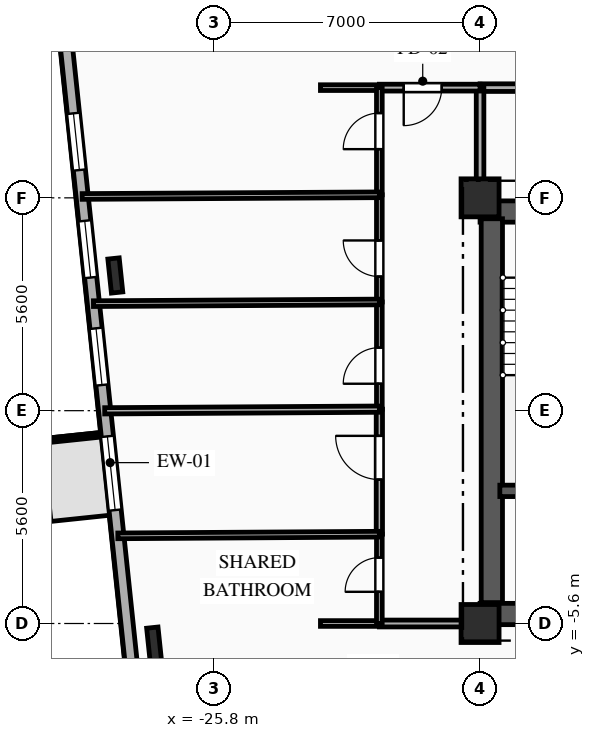
"""IFC4 building model, lengths in metres.
Left out: names, types, materials, properties, quantities, classifications, styles, units other than length and angle.
Written with IfcOpenShell. Run it as: python <this file> out.ifc"""

import sys

from ifc_helpers import new_model, si_unit, direction, frame, frame_2d, origin, origin_2d, place, context, subcontext, project, spatial, rectangle, i_section, extrude, element, fill, save


model = new_model("IFC4")
c1 = context("Model", 3, precision=1e-05, world=origin(), true_north=direction((0.0, 1.0)))
c2 = subcontext(c1, "Body", "Model", "MODEL_VIEW")
j1 = project(units=[si_unit("LENGTHUNIT", "METRE"), si_unit("PLANEANGLEUNIT", "RADIAN")], contexts=[c1])
p1 = place(None, origin())
s1 = spatial("IfcSite", under=j1, at=p1, CompositionType="ELEMENT")
p2 = place(p1, origin())
s2 = spatial("IfcBuilding", under=s1, at=p2, CompositionType="ELEMENT")
p3 = place(p2, frame((0.0, 0.0, 82.35)))
s3 = spatial("IfcBuildingStorey", under=s2, at=p3, CompositionType="ELEMENT", Elevation=82.35)
for number, where, z_axis, x_axis in (
    (1, (-18.8, -5.6, 0.0), (0.0, 0.0, 1.0), (1.0, 0.0, 0.0)),
    (2, (-18.8, 5.6, 0.0), (0.0, 0.0, 1.0), (1.0, 0.0, 0.0)),
):
    element("IfcColumn", number, at=place(p3, frame(where, z_axis=z_axis, x_axis=x_axis)), inside=s3, PredefinedType="COLUMN", context=c2, shape_type="SweptSolid", body=[
        extrude(rectangle(XDim=1.0, YDim=1.0, at=origin_2d()), origin(), (0.0, 0.0, 1.0), 3.35),
    ])
for number, where, z_axis, x_axis in (
    (3, (-28.398, 3.557, 0.0), (0.0, 0.0, 1.0), (0.995, 0.105, 0.0)),
    (4, (-27.377, -6.156, 0.0), (0.0, 0.0, 1.0), (0.995, 0.105, 0.0)),
):
    element("IfcColumn", number, at=place(p3, frame(where, z_axis=z_axis, x_axis=x_axis)), inside=s3, PredefinedType="COLUMN", context=c2, shape_type="SweptSolid", body=[
        extrude(i_section(OverallWidth=0.3, OverallDepth=0.9, WebThickness=0.019, FlangeThickness=0.035, FilletRadius=0.03, at=origin_2d()), origin(), (0.0, 0.0, 1.0), 3.35),
    ])
p4 = place(p3, frame((-26.935, -16.583, 0.0), z_axis=(0.0, 0.0, 1.0), x_axis=(-0.104524887486, 0.994522271192, 0.0)))
e5 = element("IfcWall", 5, at=p4, inside=s3, PredefinedType="SOLIDWALL", context=c2, shape_type="SweptSolid", body=[
    extrude(rectangle(XDim=30.6, YDim=0.32, at=frame_2d((15.3, 0.0))), origin(), (0.0, 0.0, 1.0), 3.045),
])
p5 = place(p4, frame((14.045, 0.0, 0.85)))
e6 = element("IfcOpeningElement", 6, at=p5, cuts=e5, PredefinedType="OPENING", context=c2, shape_type="SweptSolid", body=[
    extrude(rectangle(XDim=1.95, YDim=1.85, at=frame_2d((0.975, 0.925))), frame((0.0, 0.17, 0.0), z_axis=(0.0, -1.0, 0.0), x_axis=(1.0, 0.0, 0.0)), (0.0, 0.0, 1.0), 0.34),
])
p6 = place(p4, frame((17.354, 0.0, 0.85)))
e7 = element("IfcOpeningElement", 7, at=p6, cuts=e5, PredefinedType="OPENING", context=c2, shape_type="SweptSolid", body=[
    extrude(rectangle(XDim=1.5, YDim=1.85, at=frame_2d((0.75, 0.925))), frame((0.0, 0.17, 0.0), z_axis=(0.0, -1.0, 0.0), x_axis=(1.0, 0.0, 0.0)), (0.0, 0.0, 1.0), 0.34),
])
p7 = place(p4, frame((20.198, 0.0, 0.85)))
e8 = element("IfcOpeningElement", 8, at=p7, cuts=e5, PredefinedType="OPENING", context=c2, shape_type="SweptSolid", body=[
    extrude(rectangle(XDim=1.5, YDim=1.85, at=frame_2d((0.75, 0.925))), frame((0.0, 0.17, 0.0), z_axis=(0.0, -1.0, 0.0), x_axis=(1.0, 0.0, 0.0)), (0.0, 0.0, 1.0), 0.34),
])
p8 = place(p4, frame((23.041, 0.0, 0.85)))
e9 = element("IfcOpeningElement", 9, at=p8, cuts=e5, PredefinedType="OPENING", context=c2, shape_type="SweptSolid", body=[
    extrude(rectangle(XDim=1.5, YDim=1.85, at=frame_2d((0.75, 0.925))), frame((0.0, 0.17, 0.0), z_axis=(0.0, -1.0, 0.0), x_axis=(1.0, 0.0, 0.0)), (0.0, 0.0, 1.0), 0.34),
])
p9 = place(p3, frame((-18.8, 5.24, 0.0), z_axis=(0.0, 0.0, 1.0), x_axis=(1.0, 0.0, 0.0)))
e10 = element("IfcWall", 10, at=p9, inside=s3, PredefinedType="SHEAR", context=c2, shape_type="SweptSolid", body=[
    extrude(rectangle(XDim=9.6, YDim=0.56, at=frame_2d((4.8, 0.0))), origin(), (0.0, 0.0, 1.0), 3.045),
])
p10 = place(p9, frame((1.55, 0.0, 0.0)))
e11 = element("IfcOpeningElement", 11, at=p10, cuts=e10, PredefinedType="OPENING", context=c2, shape_type="SweptSolid", body=[
    extrude(rectangle(XDim=1.1, YDim=2.15, at=frame_2d((0.55, 1.075))), frame((0.0, 0.29, 0.0), z_axis=(0.0, -1.0, 0.0), x_axis=(1.0, 0.0, 0.0)), (0.0, 0.0, 1.0), 0.58),
])
p11 = place(p9, frame((4.775, 0.0, 0.0)))
e12 = element("IfcOpeningElement", 12, at=p11, cuts=e10, PredefinedType="OPENING", context=c2, shape_type="SweptSolid", body=[
    extrude(rectangle(XDim=1.05, YDim=2.1, at=frame_2d((0.525, 1.05))), frame((0.0, 0.29, 0.0), z_axis=(0.0, -1.0, 0.0), x_axis=(1.0, 0.0, 0.0)), (0.0, 0.0, 1.0), 0.58),
])
p12 = place(p3, frame((-18.8, -5.35, 0.0), z_axis=(0.0, 0.0, 1.0), x_axis=(1.0, 0.0, 0.0)))
e13 = element("IfcWall", 13, at=p12, inside=s3, PredefinedType="SHEAR", context=c2, shape_type="SweptSolid", body=[
    extrude(rectangle(XDim=9.6, YDim=0.56, at=frame_2d((4.8, 0.0))), origin(), (0.0, 0.0, 1.0), 3.045),
])
p13 = place(p12, frame((1.05, 0.0, 0.0)))
e14 = element("IfcOpeningElement", 14, at=p13, cuts=e13, PredefinedType="OPENING", context=c2, shape_type="SweptSolid", body=[
    extrude(rectangle(XDim=0.9, YDim=2.1, at=frame_2d((0.45, 1.05))), frame((0.0, 0.29, 0.0), z_axis=(0.0, -1.0, 0.0), x_axis=(1.0, 0.0, 0.0)), (0.0, 0.0, 1.0), 0.58),
])
p14 = place(p3, frame((-18.49, -5.05, 0.0), z_axis=(0.0, 0.0, 1.0), x_axis=(0.0, 1.0, 0.0)))
e15 = element("IfcWall", 15, at=p14, inside=s3, PredefinedType="SHEAR", context=c2, shape_type="SweptSolid", body=[
    extrude(rectangle(XDim=10.1, YDim=0.56, at=frame_2d((5.05, 0.0))), origin(), (0.0, 0.0, 1.0), 3.045),
])
p15 = place(p3, frame((-18.28, -2.11, 0.0), z_axis=(0.0, 0.0, 1.0), x_axis=(1.0, 0.0, 0.0)))
e16 = element("IfcWall", 16, at=p15, inside=s3, PredefinedType="SHEAR", context=c2, shape_type="SweptSolid", body=[
    extrude(rectangle(XDim=3.18, YDim=0.3, at=frame_2d((1.59, 0.0))), origin(), (0.0, 0.0, 1.0), 3.045),
])
p16 = place(p3, frame((-12.0, 8.5, 0.0), z_axis=(0.0, 0.0, 1.0), x_axis=(-1.0, 0.0, 0.0)))
e17 = element("IfcWall", 17, at=p16, inside=s3, PredefinedType="PARTITIONING", context=c2, shape_type="SweptSolid", body=[
    extrude(rectangle(XDim=6.8, YDim=0.2, at=frame_2d((3.4, 0.0))), origin(), (0.0, 0.0, 1.0), 3.045),
])
p17 = place(p16, frame((1.715, 0.0, 0.0)))
e18 = element("IfcOpeningElement", 18, at=p17, cuts=e17, PredefinedType="OPENING", context=c2, shape_type="SweptSolid", body=[
    extrude(rectangle(XDim=1.1, YDim=2.15, at=frame_2d((0.55, 1.075))), frame((0.0, 0.11, 0.0), z_axis=(0.0, -1.0, 0.0), x_axis=(1.0, 0.0, 0.0)), (0.0, 0.0, 1.0), 0.22),
])
p18 = place(p3, frame((-18.8, 8.5, 0.0), z_axis=(0.0, 0.0, 1.0), x_axis=(0.0, -1.0, 0.0)))
e19 = element("IfcWall", 19, at=p18, inside=s3, PredefinedType="PARTITIONING", context=c2, shape_type="SweptSolid", body=[
    extrude(rectangle(XDim=2.9, YDim=0.2, at=frame_2d((1.45, 0.0))), origin(), (0.0, 0.0, 1.0), 2.53),
])
p19 = place(p3, frame((-18.8, 8.5, 0.0), z_axis=(0.0, 0.0, 1.0), x_axis=(-1.0, 0.0, 0.0)))
e20 = element("IfcWall", 20, at=p19, inside=s3, PredefinedType="PARTITIONING", context=c2, shape_type="SweptSolid", body=[
    extrude(rectangle(XDim=2.65, YDim=0.18, at=frame_2d((1.325, 0.0))), origin(), (0.0, 0.0, 1.0), 3.045),
])
p20 = place(p19, frame((1.009, 0.0, 0.0)))
e21 = element("IfcOpeningElement", 21, at=p20, cuts=e20, PredefinedType="OPENING", context=c2, shape_type="SweptSolid", body=[
    extrude(rectangle(XDim=1.0, YDim=2.15, at=frame_2d((0.5, 1.075))), frame((0.0, 0.1, 0.0), z_axis=(0.0, -1.0, 0.0), x_axis=(1.0, 0.0, 0.0)), (0.0, 0.0, 1.0), 0.2),
])
p21 = place(p3, frame((-21.45, 8.5, 0.0), z_axis=(0.0, 0.0, 1.0), x_axis=(-1.0, 0.0, 0.0)))
e22 = element("IfcWall", 22, at=p21, inside=s3, PredefinedType="PARTITIONING", context=c2, shape_type="SweptSolid", body=[
    extrude(rectangle(XDim=1.55, YDim=0.15, at=frame_2d((0.775, 0.0))), origin(), (0.0, 0.0, 1.0), 3.045),
])
p22 = place(p3, frame((-21.45, -5.6, 0.0), z_axis=(0.0, 0.0, 1.0), x_axis=(1.0, 0.0, 0.0)))
e23 = element("IfcWall", 23, at=p22, inside=s3, PredefinedType="PARTITIONING", context=c2, shape_type="SweptSolid", body=[
    extrude(rectangle(XDim=2.65, YDim=0.18, at=frame_2d((1.325, 0.0))), origin(), (0.0, 0.0, 1.0), 3.045),
])
p23 = place(p3, frame((-23.0, -5.6, 0.0), z_axis=(0.0, 0.0, 1.0), x_axis=(1.0, 0.0, 0.0)))
e24 = element("IfcWall", 24, at=p23, inside=s3, PredefinedType="PLUMBINGWALL", context=c2, shape_type="SweptSolid", body=[
    extrude(rectangle(XDim=1.55, YDim=0.15, at=frame_2d((0.775, 0.0))), origin(), (0.0, 0.0, 1.0), 3.045),
])
p24 = place(p3, frame((-21.45, -5.6, 0.0), z_axis=(0.0, 0.0, 1.0), x_axis=(0.0, 1.0, 0.0)))
e25 = element("IfcWall", 25, at=p24, inside=s3, PredefinedType="PLUMBINGWALL", context=c2, shape_type="SweptSolid", body=[
    extrude(rectangle(XDim=2.35, YDim=0.15, at=frame_2d((1.175, 0.0))), origin(), (0.0, 0.0, 1.0), 3.045),
])
p25 = place(p24, frame((0.834, 0.0, 0.0)))
e26 = element("IfcOpeningElement", 26, at=p25, cuts=e25, PredefinedType="OPENING", context=c2, shape_type="SweptSolid", body=[
    extrude(rectangle(XDim=0.9, YDim=2.1, at=frame_2d((0.45, 1.05))), frame((0.0, 0.085, 0.0), z_axis=(0.0, -1.0, 0.0), x_axis=(1.0, 0.0, 0.0)), (0.0, 0.0, 1.0), 0.17),
])
p26 = place(p3, frame((-21.45, -3.25, 0.0), z_axis=(0.0, 0.0, 1.0), x_axis=(0.0, 1.0, 0.0)))
e27 = element("IfcWall", 27, at=p26, inside=s3, PredefinedType="PARTITIONING", context=c2, shape_type="SweptSolid", body=[
    extrude(rectangle(XDim=3.29, YDim=0.165, at=frame_2d((1.645, 0.0))), origin(), (0.0, 0.0, 1.0), 3.045),
])
p27 = place(p26, frame((1.438, 0.0, 0.0)))
e28 = element("IfcOpeningElement", 28, at=p27, cuts=e27, PredefinedType="OPENING", context=c2, shape_type="SweptSolid", body=[
    extrude(rectangle(XDim=1.15, YDim=2.15, at=frame_2d((0.575, 1.075))), frame((0.0, 0.093, 0.0), z_axis=(0.0, -1.0, 0.0), x_axis=(1.0, 0.0, 0.0)), (0.0, 0.0, 1.0), 0.185),
])
p28 = place(p3, frame((-21.45, 0.04, 0.0), z_axis=(0.0, 0.0, 1.0), x_axis=(0.0, 1.0, 0.0)))
e29 = element("IfcWall", 29, at=p28, inside=s3, PredefinedType="PARTITIONING", context=c2, shape_type="SweptSolid", body=[
    extrude(rectangle(XDim=2.82, YDim=0.15, at=frame_2d((1.41, 0.0))), origin(), (0.0, 0.0, 1.0), 3.045),
])
p29 = place(p28, frame((0.669, 0.0, 0.0)))
e30 = element("IfcOpeningElement", 30, at=p29, cuts=e29, PredefinedType="OPENING", context=c2, shape_type="SweptSolid", body=[
    extrude(rectangle(XDim=0.95, YDim=2.1, at=frame_2d((0.475, 1.05))), frame((0.0, 0.085, 0.0), z_axis=(0.0, -1.0, 0.0), x_axis=(1.0, 0.0, 0.0)), (0.0, 0.0, 1.0), 0.17),
])
p30 = place(p3, frame((-21.45, 2.86, 0.0), z_axis=(0.0, 0.0, 1.0), x_axis=(0.0, 1.0, 0.0)))
e31 = element("IfcWall", 31, at=p30, inside=s3, PredefinedType="PARTITIONING", context=c2, shape_type="SweptSolid", body=[
    extrude(rectangle(XDim=2.82, YDim=0.15, at=frame_2d((1.41, 0.0))), origin(), (0.0, 0.0, 1.0), 3.045),
])
p31 = place(p30, frame((0.669, 0.0, 0.0)))
e32 = element("IfcOpeningElement", 32, at=p31, cuts=e31, PredefinedType="OPENING", context=c2, shape_type="SweptSolid", body=[
    extrude(rectangle(XDim=0.95, YDim=2.1, at=frame_2d((0.475, 1.05))), frame((0.0, 0.085, 0.0), z_axis=(0.0, -1.0, 0.0), x_axis=(1.0, 0.0, 0.0)), (0.0, 0.0, 1.0), 0.17),
])
p32 = place(p3, frame((-21.45, 5.68, 0.0), z_axis=(0.0, 0.0, 1.0), x_axis=(0.0, 1.0, 0.0)))
e33 = element("IfcWall", 33, at=p32, inside=s3, PredefinedType="PARTITIONING", context=c2, shape_type="SweptSolid", body=[
    extrude(rectangle(XDim=2.82, YDim=0.15, at=frame_2d((1.41, 0.0))), origin(), (0.0, 0.0, 1.0), 3.045),
])
p33 = place(p32, frame((1.201, 0.0, 0.0)))
e34 = element("IfcOpeningElement", 34, at=p33, cuts=e33, PredefinedType="OPENING", context=c2, shape_type="SweptSolid", body=[
    extrude(rectangle(XDim=0.95, YDim=2.1, at=frame_2d((0.475, 1.05))), frame((0.0, 0.085, 0.0), z_axis=(0.0, -1.0, 0.0), x_axis=(1.0, 0.0, 0.0)), (0.0, 0.0, 1.0), 0.17),
])
p34 = place(p3, frame((-28.332, -3.294, 0.0), z_axis=(0.0, 0.0, 1.0), x_axis=(0.99997961062, 0.006385792383, 0.0)))
e35 = element("IfcWall", 35, at=p34, inside=s3, PredefinedType="PLUMBINGWALL", context=c2, shape_type="SweptSolid", body=[
    extrude(rectangle(XDim=6.882, YDim=0.15, at=frame_2d((3.441, 0.0))), origin(), (0.0, 0.0, 1.0), 3.045),
])
p35 = place(p3, frame((-28.677, -0.004, 0.0), z_axis=(0.0, 0.0, 1.0), x_axis=(0.999981514486, 0.006080352417, 0.0)))
e36 = element("IfcWall", 36, at=p35, inside=s3, PredefinedType="PARTITIONING", context=c2, shape_type="SweptSolid", body=[
    extrude(rectangle(XDim=7.228, YDim=0.165, at=frame_2d((3.614, 0.0))), origin(), (0.0, 0.0, 1.0), 3.045),
])
p36 = place(p3, frame((-28.974, 2.816, 0.0), z_axis=(0.0, 0.0, 1.0), x_axis=(0.999982942193, 0.00584083232, 0.0)))
e37 = element("IfcWall", 37, at=p36, inside=s3, PredefinedType="PARTITIONING", context=c2, shape_type="SweptSolid", body=[
    extrude(rectangle(XDim=7.524, YDim=0.15, at=frame_2d((3.762, 0.0))), origin(), (0.0, 0.0, 1.0), 2.53),
])
p37 = place(p3, frame((-29.27, 5.636, 0.0), z_axis=(0.0, 0.0, 1.0), x_axis=(0.999984210669, 0.005619467326, 0.0)))
e38 = element("IfcWall", 38, at=p37, inside=s3, PredefinedType="PARTITIONING", context=c2, shape_type="SweptSolid", body=[
    extrude(rectangle(XDim=7.82, YDim=0.15, at=frame_2d((3.91, 0.0))), origin(), (0.0, 0.0, 1.0), 3.045),
])
p38 = place(p5, origin())
e39 = element("IfcWindow", 39, at=p38, inside=s3, PartitioningType="SINGLE_PANEL", PredefinedType="WINDOW", context=c2, shape_type="SweptSolid", body=[
    extrude(rectangle(XDim=1.95, YDim=1.85, at=frame_2d((0.975, 0.925))), frame((0.0, 0.03, 0.0), z_axis=(0.0, -1.0, 0.0), x_axis=(1.0, 0.0, 0.0)), (0.0, 0.0, 1.0), 0.06),
])
fill(e6, e39)
p39 = place(p6, origin())
e40 = element("IfcWindow", 40, at=p39, inside=s3, PartitioningType="SINGLE_PANEL", PredefinedType="WINDOW", context=c2, shape_type="SweptSolid", body=[
    extrude(rectangle(XDim=1.5, YDim=1.85, at=frame_2d((0.75, 0.925))), frame((0.0, 0.03, 0.0), z_axis=(0.0, -1.0, 0.0), x_axis=(1.0, 0.0, 0.0)), (0.0, 0.0, 1.0), 0.06),
])
fill(e7, e40)
p40 = place(p7, origin())
e41 = element("IfcWindow", 41, at=p40, inside=s3, PartitioningType="SINGLE_PANEL", PredefinedType="WINDOW", context=c2, shape_type="SweptSolid", body=[
    extrude(rectangle(XDim=1.5, YDim=1.85, at=frame_2d((0.75, 0.925))), frame((0.0, 0.03, 0.0), z_axis=(0.0, -1.0, 0.0), x_axis=(1.0, 0.0, 0.0)), (0.0, 0.0, 1.0), 0.06),
])
fill(e8, e41)
p41 = place(p8, origin())
e42 = element("IfcWindow", 42, at=p41, inside=s3, PartitioningType="SINGLE_PANEL", PredefinedType="WINDOW", context=c2, shape_type="SweptSolid", body=[
    extrude(rectangle(XDim=1.5, YDim=1.85, at=frame_2d((0.75, 0.925))), frame((0.0, 0.03, 0.0), z_axis=(0.0, -1.0, 0.0), x_axis=(1.0, 0.0, 0.0)), (0.0, 0.0, 1.0), 0.06),
])
fill(e9, e42)
p42 = place(p20, origin())
e43 = element("IfcDoor", 43, at=p42, inside=s3, OperationType="SINGLE_SWING_RIGHT", PredefinedType="DOOR", context=c2, shape_type="SweptSolid", body=[
    extrude(rectangle(XDim=1.0, YDim=2.15, at=frame_2d((0.5, 1.075))), frame((0.0, 0.025, 0.0), z_axis=(0.0, -1.0, 0.0), x_axis=(1.0, 0.0, 0.0)), (0.0, 0.0, 1.0), 0.05),
])
fill(e21, e43)
p43 = place(p25, origin())
e44 = element("IfcDoor", 44, at=p43, inside=s3, OperationType="SINGLE_SWING_LEFT", PredefinedType="DOOR", context=c2, shape_type="SweptSolid", body=[
    extrude(rectangle(XDim=0.9, YDim=2.1, at=frame_2d((0.45, 1.05))), frame((0.0, 0.025, 0.0), z_axis=(0.0, -1.0, 0.0), x_axis=(1.0, 0.0, 0.0)), (0.0, 0.0, 1.0), 0.05),
])
fill(e26, e44)
p44 = place(p27, origin())
e45 = element("IfcDoor", 45, at=p44, inside=s3, OperationType="SINGLE_SWING_RIGHT", PredefinedType="DOOR", context=c2, shape_type="SweptSolid", body=[
    extrude(rectangle(XDim=1.15, YDim=2.15, at=frame_2d((0.575, 1.075))), frame((0.0, 0.025, 0.0), z_axis=(0.0, -1.0, 0.0), x_axis=(1.0, 0.0, 0.0)), (0.0, 0.0, 1.0), 0.05),
])
fill(e28, e45)
p45 = place(p29, origin())
e46 = element("IfcDoor", 46, at=p45, inside=s3, OperationType="SINGLE_SWING_LEFT", PredefinedType="DOOR", context=c2, shape_type="SweptSolid", body=[
    extrude(rectangle(XDim=0.95, YDim=2.1, at=frame_2d((0.475, 1.05))), frame((0.0, 0.025, 0.0), z_axis=(0.0, -1.0, 0.0), x_axis=(1.0, 0.0, 0.0)), (0.0, 0.0, 1.0), 0.05),
])
fill(e30, e46)
p46 = place(p31, origin())
e47 = element("IfcDoor", 47, at=p46, inside=s3, OperationType="SINGLE_SWING_RIGHT", PredefinedType="DOOR", context=c2, shape_type="SweptSolid", body=[
    extrude(rectangle(XDim=0.95, YDim=2.1, at=frame_2d((0.475, 1.05))), frame((0.0, 0.025, 0.0), z_axis=(0.0, -1.0, 0.0), x_axis=(1.0, 0.0, 0.0)), (0.0, 0.0, 1.0), 0.05),
])
fill(e32, e47)
p47 = place(p33, origin())
e48 = element("IfcDoor", 48, at=p47, inside=s3, OperationType="SINGLE_SWING_LEFT", PredefinedType="DOOR", context=c2, shape_type="SweptSolid", body=[
    extrude(rectangle(XDim=0.95, YDim=2.1, at=frame_2d((0.475, 1.05))), frame((0.0, 0.025, 0.0), z_axis=(0.0, -1.0, 0.0), x_axis=(1.0, 0.0, 0.0)), (0.0, 0.0, 1.0), 0.05),
])
fill(e34, e48)
save(model, sys.argv[1])
